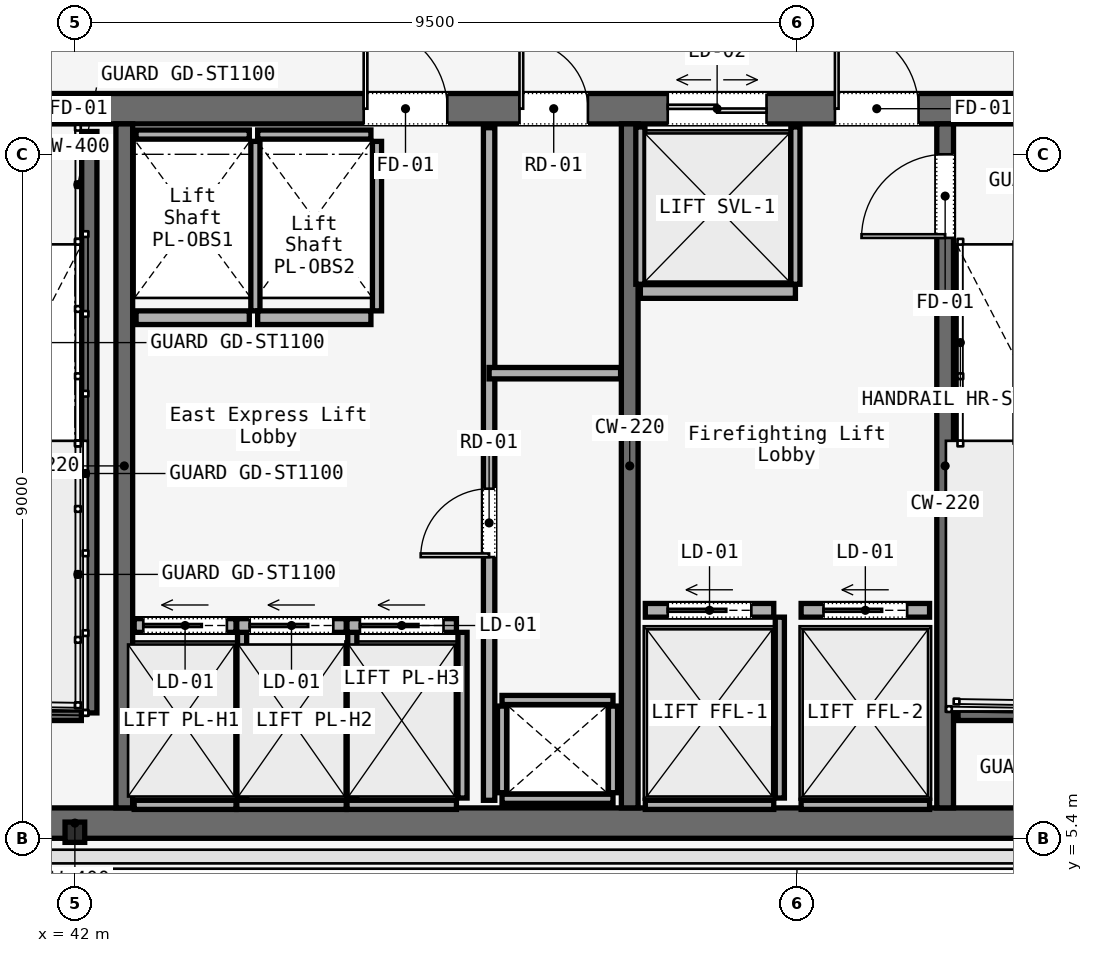
"""IFC4 building model, lengths in metres.
Left out: names, types, materials, properties, quantities, classifications, styles, units other than length and angle.
Written with IfcOpenShell. Run it as: python <this file> out.ifc"""

import sys

from ifc_helpers import new_model, si_unit, direction, frame, frame_2d, origin, origin_2d, place, context, subcontext, project, spatial, rectangle, i_section, extrude, element, fill, save


model = new_model("IFC4")
c1 = context("Model", 3, precision=1e-05, world=origin(), true_north=direction((0.0, 1.0)))
c2 = subcontext(c1, "Body", "Model", "MODEL_VIEW")
j1 = project(units=[si_unit("LENGTHUNIT", "METRE"), si_unit("PLANEANGLEUNIT", "RADIAN")], contexts=[c1])
p1 = place(None, origin())
s1 = spatial("IfcSite", under=j1, at=p1, CompositionType="ELEMENT")
p2 = place(p1, origin())
s2 = spatial("IfcBuilding", under=s1, at=p2, CompositionType="ELEMENT")
p3 = place(p2, frame((0.0, 0.0, 294.7)))
s3 = spatial("IfcBuildingStorey", under=s2, at=p3, CompositionType="ELEMENT", Elevation=294.7)
p4 = place(p3, frame((26.45, 15.0, 0.0), z_axis=(0.0, 0.0, 1.0), x_axis=(1.0, 0.0, 0.0)))
e1 = element("IfcWall", 1, at=p4, inside=s3, PredefinedType="SOLIDWALL", context=c2, shape_type="SweptSolid", body=[
    extrude(rectangle(XDim=31.1, YDim=0.4, at=frame_2d((15.55, 0.0))), origin(), (0.0, 0.0, 1.0), 3.52),
])
p5 = place(p4, frame((1.65, 0.0, 0.0)))
e2 = element("IfcOpeningElement", 2, at=p5, cuts=e1, PredefinedType="OPENING", context=c2, shape_type="SweptSolid", body=[
    extrude(rectangle(XDim=1.1, YDim=2.2, at=frame_2d((0.55, 1.1))), frame((0.0, 0.2, 0.0), z_axis=(0.0, -1.0, 0.0), x_axis=(1.0, 0.0, 0.0)), (0.0, 0.0, 1.0), 0.4),
])
p6 = place(p4, frame((13.65, 0.0, 0.0)))
e3 = element("IfcOpeningElement", 3, at=p6, cuts=e1, PredefinedType="OPENING", context=c2, shape_type="SweptSolid", body=[
    extrude(rectangle(XDim=1.1, YDim=2.2, at=frame_2d((0.55, 1.1))), frame((0.0, 0.2, 0.0), z_axis=(0.0, -1.0, 0.0), x_axis=(1.0, 0.0, 0.0)), (0.0, 0.0, 1.0), 0.4),
])
p7 = place(p4, frame((25.55, 0.0, 0.0)))
e4 = element("IfcOpeningElement", 4, at=p7, cuts=e1, PredefinedType="OPENING", context=c2, shape_type="SweptSolid", body=[
    extrude(rectangle(XDim=1.1, YDim=2.2, at=frame_2d((0.55, 1.1))), frame((0.0, 0.2, 0.0), z_axis=(0.0, -1.0, 0.0), x_axis=(1.0, 0.0, 0.0)), (0.0, 0.0, 1.0), 0.4),
])
p8 = place(p4, frame((19.35, 0.0, 0.0)))
e5 = element("IfcOpeningElement", 5, at=p8, cuts=e1, PredefinedType="OPENING", context=c2, shape_type="SweptSolid", body=[
    extrude(rectangle(XDim=1.1, YDim=2.2, at=frame_2d((0.55, 1.1))), frame((0.0, 0.2, 0.0), z_axis=(0.0, -1.0, 0.0), x_axis=(1.0, 0.0, 0.0)), (0.0, 0.0, 1.0), 0.4),
])
p9 = place(p4, frame((21.4, 0.0, 0.0)))
e6 = element("IfcOpeningElement", 6, at=p9, cuts=e1, PredefinedType="OPENING", context=c2, shape_type="SweptSolid", body=[
    extrude(rectangle(XDim=0.9, YDim=2.1, at=frame_2d((0.45, 1.05))), frame((0.0, 0.2, 0.0), z_axis=(0.0, -1.0, 0.0), x_axis=(1.0, 0.0, 0.0)), (0.0, 0.0, 1.0), 0.4),
])
p10 = place(p4, frame((5.14, 0.0, 0.0)))
e7 = element("IfcOpeningElement", 7, at=p10, cuts=e1, PredefinedType="OPENING", context=c2, shape_type="SweptSolid", body=[
    extrude(rectangle(XDim=0.95, YDim=2.2, at=frame_2d((0.475, 1.1))), frame((0.0, 0.2, 0.0), z_axis=(0.0, -1.0, 0.0), x_axis=(1.0, 0.0, 0.0)), (0.0, 0.0, 1.0), 0.4),
])
p11 = place(p4, frame((7.825, 0.0, 0.0)))
e8 = element("IfcOpeningElement", 8, at=p11, cuts=e1, PredefinedType="OPENING", context=c2, shape_type="SweptSolid", body=[
    extrude(rectangle(XDim=0.95, YDim=2.2, at=frame_2d((0.475, 1.1))), frame((0.0, 0.2, 0.0), z_axis=(0.0, -1.0, 0.0), x_axis=(1.0, 0.0, 0.0)), (0.0, 0.0, 1.0), 0.4),
])
p12 = place(p4, frame((10.46, 0.0, 0.0)))
e9 = element("IfcOpeningElement", 9, at=p12, cuts=e1, PredefinedType="OPENING", context=c2, shape_type="SweptSolid", body=[
    extrude(rectangle(XDim=0.95, YDim=2.2, at=frame_2d((0.475, 1.1))), frame((0.0, 0.2, 0.0), z_axis=(0.0, -1.0, 0.0), x_axis=(1.0, 0.0, 0.0)), (0.0, 0.0, 1.0), 0.4),
])
p13 = place(p4, frame((23.35, 0.0, 0.0)))
e10 = element("IfcOpeningElement", 10, at=p13, cuts=e1, PredefinedType="OPENING", context=c2, shape_type="SweptSolid", body=[
    extrude(rectangle(XDim=1.3, YDim=2.3, at=frame_2d((0.65, 1.15))), frame((0.0, 0.2, 0.0), z_axis=(0.0, -1.0, 0.0), x_axis=(1.0, 0.0, 0.0)), (0.0, 0.0, 1.0), 0.4),
])
p14 = place(p3, frame((26.45, 5.6, 0.0), z_axis=(0.0, 0.0, 1.0), x_axis=(1.0, 0.0, 0.0)))
e11 = element("IfcWall", 11, at=p14, inside=s3, PredefinedType="SOLIDWALL", context=c2, shape_type="SweptSolid", body=[
    extrude(rectangle(XDim=31.1, YDim=0.4, at=frame_2d((15.55, 0.0))), origin(), (0.0, 0.0, 1.0), 3.52),
])
for number, where, z_axis, x_axis in (
    (12, (42.65, 5.8, 0.0), (0.0, 0.0, 1.0), (0.0, 1.0, 0.0)),
    (13, (49.3, 5.8, 0.0), (0.0, 0.0, 1.0), (0.0, 1.0, 0.0)),
):
    element("IfcWall", number, at=place(p3, frame(where, z_axis=z_axis, x_axis=x_axis)), inside=s3, PredefinedType="SOLIDWALL", context=c2, shape_type="SweptSolid", body=[
        extrude(rectangle(XDim=9.0, YDim=0.22, at=frame_2d((4.5, 0.0))), origin(), (0.0, 0.0, 1.0), 3.52),
    ])
p15 = place(p3, frame((53.45, 5.8, 0.0), z_axis=(0.0, 0.0, 1.0), x_axis=(0.0, 1.0, 0.0)))
e14 = element("IfcWall", 14, at=p15, inside=s3, PredefinedType="SOLIDWALL", context=c2, shape_type="SweptSolid", body=[
    extrude(rectangle(XDim=9.0, YDim=0.22, at=frame_2d((4.5, 0.0))), origin(), (0.0, 0.0, 1.0), 3.52),
])
p16 = place(p15, frame((7.5, 0.0, 0.0)))
e15 = element("IfcOpeningElement", 15, at=p16, cuts=e14, PredefinedType="OPENING", context=c2, shape_type="SweptSolid", body=[
    extrude(rectangle(XDim=1.1, YDim=2.2, at=frame_2d((0.55, 1.1))), frame((0.0, 0.11, 0.0), z_axis=(0.0, -1.0, 0.0), x_axis=(1.0, 0.0, 0.0)), (0.0, 0.0, 1.0), 0.22),
])
p17 = place(p3, frame((42.0, 5.48, 0.0), z_axis=(0.0, 0.0, 1.0), x_axis=(1.0, 0.0, 0.0)))
e16 = element("IfcColumn", 16, at=p17, inside=s3, PredefinedType="COLUMN", context=c2, shape_type="SweptSolid", body=[
    extrude(i_section(OverallWidth=0.259, OverallDepth=0.267, WebThickness=0.013, FlangeThickness=0.021, FilletRadius=0.013, at=origin_2d()), origin(), (0.0, 0.0, 1.0), 3.52),
])
p18 = place(p3, frame((42.19, 14.7, 0.0), z_axis=(0.0, 0.0, 1.0), x_axis=(0.0, -1.0, 0.0)))
e17 = element("IfcWall", 17, at=p18, inside=s3, PredefinedType="SOLIDWALL", context=c2, shape_type="SweptSolid", body=[
    extrude(rectangle(XDim=7.65, YDim=0.2, at=frame_2d((3.825, 0.0))), origin(), (0.0, 0.0, 1.0), 3.8),
])
for number, where, z_axis, x_axis in (
    (18, (38.97, 7.05, 0.0), (0.0, 0.0, 1.0), (1.0, 0.0, 0.0)),
    (19, (53.62, 7.05, 0.0), (0.0, 0.0, 1.0), (1.0, 0.0, 0.0)),
):
    element("IfcWall", number, at=place(p3, frame(where, z_axis=z_axis, x_axis=x_axis)), inside=s3, PredefinedType="SOLIDWALL", context=c2, shape_type="SweptSolid", body=[
        extrude(rectangle(XDim=3.115, YDim=0.2, at=frame_2d((1.558, 0.0))), origin(), (0.0, 0.0, 1.0), 3.8),
    ])
for number, where, z_axis, x_axis in (
    (20, (47.62, 5.92, 0.0), (0.0, 0.0, 1.0), (1.0, 0.0, 0.0)),
    (21, (47.62, 7.22, 0.0), (0.0, 0.0, 1.0), (1.0, 0.0, 0.0)),
):
    element("IfcWall", number, at=place(p3, frame(where, z_axis=z_axis, x_axis=x_axis)), inside=s3, PredefinedType="SOLIDWALL", context=c2, shape_type="SweptSolid", body=[
        extrude(rectangle(XDim=1.46, YDim=0.12, at=frame_2d((0.73, 0.0))), origin(), (0.0, 0.0, 1.0), 2.95),
    ])
for number, where, z_axis, x_axis in (
    (22, (47.62, 6.0, 0.0), (0.0, 0.0, 1.0), (0.0, 1.0, 0.0)),
    (23, (49.08, 6.0, 0.0), (0.0, 0.0, 1.0), (0.0, 1.0, 0.0)),
):
    element("IfcWall", number, at=place(p3, frame(where, z_axis=z_axis, x_axis=x_axis)), inside=s3, PredefinedType="SOLIDWALL", context=c2, shape_type="SweptSolid", body=[
        extrude(rectangle(XDim=1.14, YDim=0.12, at=frame_2d((0.57, 0.0))), origin(), (0.0, 0.0, 1.0), 2.95),
    ])
p19 = place(p3, frame((47.45, 5.9, 0.0), z_axis=(0.0, 0.0, 1.0), x_axis=(0.0, 1.0, 0.0)))
e24 = element("IfcWall", 24, at=p19, inside=s3, PredefinedType="PARTITIONING", context=c2, shape_type="SweptSolid", body=[
    extrude(rectangle(XDim=8.85, YDim=0.15, at=frame_2d((4.425, 0.0))), origin(), (0.0, 0.0, 1.0), 2.95),
])
p20 = place(p19, frame((3.2, 0.0, 0.0)))
e25 = element("IfcOpeningElement", 25, at=p20, cuts=e24, PredefinedType="OPENING", context=c2, shape_type="SweptSolid", body=[
    extrude(rectangle(XDim=0.9, YDim=2.1, at=frame_2d((0.45, 1.05))), frame((0.0, 0.075, 0.0), z_axis=(0.0, -1.0, 0.0), x_axis=(1.0, 0.0, 0.0)), (0.0, 0.0, 1.0), 0.15),
])
p21 = place(p3, frame((47.45, 11.52, 0.0), z_axis=(0.0, 0.0, 1.0), x_axis=(1.0, 0.0, 0.0)))
e26 = element("IfcWall", 26, at=p21, inside=s3, PredefinedType="PARTITIONING", context=c2, shape_type="SweptSolid", body=[
    extrude(rectangle(XDim=1.73, YDim=0.15, at=frame_2d((0.865, 0.0))), origin(), (0.0, 0.0, 1.0), 2.95),
])
p22 = place(p3, frame((42.78, 8.2, 0.0), z_axis=(0.0, 0.0, 1.0), x_axis=(1.0, 0.0, 0.0)))
e27 = element("IfcWall", 27, at=p22, inside=s3, PredefinedType="SOLIDWALL", context=c2, shape_type="SweptSolid", body=[
    extrude(rectangle(XDim=1.34, YDim=0.18, at=frame_2d((0.67, 0.0))), origin(), (0.0, 0.0, 1.0), 2.95),
])
p23 = place(p22, frame((0.12, 0.0, 0.0)))
e28 = element("IfcOpeningElement", 28, at=p23, cuts=e27, PredefinedType="OPENING", context=c2, shape_type="SweptSolid", body=[
    extrude(rectangle(XDim=1.1, YDim=2.2, at=frame_2d((0.55, 1.1))), frame((0.0, 0.09, 0.0), z_axis=(0.0, -1.0, 0.0), x_axis=(1.0, 0.0, 0.0)), (0.0, 0.0, 1.0), 0.18),
])
p24 = place(p3, frame((42.78, 5.84, 0.0), z_axis=(0.0, 0.0, 1.0), x_axis=(1.0, 0.0, 0.0)))
e29 = element("IfcWall", 29, at=p24, inside=s3, PredefinedType="SOLIDWALL", context=c2, shape_type="SweptSolid", body=[
    extrude(rectangle(XDim=1.34, YDim=0.12, at=frame_2d((0.67, 0.0))), origin(), (0.0, 0.0, 1.0), 2.95),
])
p25 = place(p3, frame((44.2, 5.93, 0.0), z_axis=(0.0, 0.0, 1.0), x_axis=(0.0, 1.0, 0.0)))
e30 = element("IfcWall", 30, at=p25, inside=s3, PredefinedType="SOLIDWALL", context=c2, shape_type="SweptSolid", body=[
    extrude(rectangle(XDim=2.18, YDim=0.12, at=frame_2d((1.09, 0.0))), origin(), (0.0, 0.0, 1.0), 2.95),
])
p26 = place(p3, frame((44.13, 8.2, 0.0), z_axis=(0.0, 0.0, 1.0), x_axis=(1.0, 0.0, 0.0)))
e31 = element("IfcWall", 31, at=p26, inside=s3, PredefinedType="SOLIDWALL", context=c2, shape_type="SweptSolid", body=[
    extrude(rectangle(XDim=1.44, YDim=0.18, at=frame_2d((0.72, 0.0))), origin(), (0.0, 0.0, 1.0), 2.95),
])
p27 = place(p26, frame((0.17, 0.0, 0.0)))
e32 = element("IfcOpeningElement", 32, at=p27, cuts=e31, PredefinedType="OPENING", context=c2, shape_type="SweptSolid", body=[
    extrude(rectangle(XDim=1.1, YDim=2.2, at=frame_2d((0.55, 1.1))), frame((0.0, 0.09, 0.0), z_axis=(0.0, -1.0, 0.0), x_axis=(1.0, 0.0, 0.0)), (0.0, 0.0, 1.0), 0.18),
])
p28 = place(p3, frame((44.13, 5.84, 0.0), z_axis=(0.0, 0.0, 1.0), x_axis=(1.0, 0.0, 0.0)))
e33 = element("IfcWall", 33, at=p28, inside=s3, PredefinedType="SOLIDWALL", context=c2, shape_type="SweptSolid", body=[
    extrude(rectangle(XDim=1.44, YDim=0.12, at=frame_2d((0.72, 0.0))), origin(), (0.0, 0.0, 1.0), 2.95),
])
p29 = place(p3, frame((45.65, 5.93, 0.0), z_axis=(0.0, 0.0, 1.0), x_axis=(0.0, 1.0, 0.0)))
e34 = element("IfcWall", 34, at=p29, inside=s3, PredefinedType="SOLIDWALL", context=c2, shape_type="SweptSolid", body=[
    extrude(rectangle(XDim=2.18, YDim=0.12, at=frame_2d((1.09, 0.0))), origin(), (0.0, 0.0, 1.0), 2.95),
])
p30 = place(p3, frame((45.58, 8.2, 0.0), z_axis=(0.0, 0.0, 1.0), x_axis=(1.0, 0.0, 0.0)))
e35 = element("IfcWall", 35, at=p30, inside=s3, PredefinedType="SOLIDWALL", context=c2, shape_type="SweptSolid", body=[
    extrude(rectangle(XDim=1.44, YDim=0.18, at=frame_2d((0.72, 0.0))), origin(), (0.0, 0.0, 1.0), 2.95),
])
p31 = place(p30, frame((0.17, 0.0, 0.0)))
e36 = element("IfcOpeningElement", 36, at=p31, cuts=e35, PredefinedType="OPENING", context=c2, shape_type="SweptSolid", body=[
    extrude(rectangle(XDim=1.1, YDim=2.2, at=frame_2d((0.55, 1.1))), frame((0.0, 0.09, 0.0), z_axis=(0.0, -1.0, 0.0), x_axis=(1.0, 0.0, 0.0)), (0.0, 0.0, 1.0), 0.18),
])
p32 = place(p3, frame((45.58, 5.84, 0.0), z_axis=(0.0, 0.0, 1.0), x_axis=(1.0, 0.0, 0.0)))
e37 = element("IfcWall", 37, at=p32, inside=s3, PredefinedType="SOLIDWALL", context=c2, shape_type="SweptSolid", body=[
    extrude(rectangle(XDim=1.44, YDim=0.12, at=frame_2d((0.72, 0.0))), origin(), (0.0, 0.0, 1.0), 2.95),
])
p33 = place(p3, frame((47.1, 5.93, 0.0), z_axis=(0.0, 0.0, 1.0), x_axis=(0.0, 1.0, 0.0)))
e38 = element("IfcWall", 38, at=p33, inside=s3, PredefinedType="SOLIDWALL", context=c2, shape_type="SweptSolid", body=[
    extrude(rectangle(XDim=2.18, YDim=0.12, at=frame_2d((1.09, 0.0))), origin(), (0.0, 0.0, 1.0), 2.95),
])
p34 = place(p3, frame((42.805, 12.25, 0.0), z_axis=(0.0, 0.0, 1.0), x_axis=(1.0, 0.0, 0.0)))
e39 = element("IfcWall", 39, at=p34, inside=s3, PredefinedType="SOLIDWALL", context=c2, shape_type="SweptSolid", body=[
    extrude(rectangle(XDim=1.49, YDim=0.18, at=frame_2d((0.745, 0.0))), origin(), (0.0, 0.0, 1.0), 2.95),
])
p35 = place(p3, frame((42.805, 14.66, 0.0), z_axis=(0.0, 0.0, 1.0), x_axis=(1.0, 0.0, 0.0)))
e40 = element("IfcWall", 40, at=p35, inside=s3, PredefinedType="SOLIDWALL", context=c2, shape_type="SweptSolid", body=[
    extrude(rectangle(XDim=1.49, YDim=0.12, at=frame_2d((0.745, 0.0))), origin(), (0.0, 0.0, 1.0), 2.95),
])
p36 = place(p3, frame((44.375, 12.34, 0.0), z_axis=(0.0, 0.0, 1.0), x_axis=(0.0, 1.0, 0.0)))
e41 = element("IfcWall", 41, at=p36, inside=s3, PredefinedType="SOLIDWALL", context=c2, shape_type="SweptSolid", body=[
    extrude(rectangle(XDim=2.23, YDim=0.12, at=frame_2d((1.115, 0.0))), origin(), (0.0, 0.0, 1.0), 2.95),
])
p37 = place(p3, frame((44.405, 12.25, 0.0), z_axis=(0.0, 0.0, 1.0), x_axis=(1.0, 0.0, 0.0)))
e42 = element("IfcWall", 42, at=p37, inside=s3, PredefinedType="SOLIDWALL", context=c2, shape_type="SweptSolid", body=[
    extrude(rectangle(XDim=1.49, YDim=0.18, at=frame_2d((0.745, 0.0))), origin(), (0.0, 0.0, 1.0), 2.95),
])
p38 = place(p3, frame((44.405, 14.66, 0.0), z_axis=(0.0, 0.0, 1.0), x_axis=(1.0, 0.0, 0.0)))
e43 = element("IfcWall", 43, at=p38, inside=s3, PredefinedType="SOLIDWALL", context=c2, shape_type="SweptSolid", body=[
    extrude(rectangle(XDim=1.49, YDim=0.12, at=frame_2d((0.745, 0.0))), origin(), (0.0, 0.0, 1.0), 2.95),
])
p39 = place(p3, frame((45.975, 12.34, 0.0), z_axis=(0.0, 0.0, 1.0), x_axis=(0.0, 1.0, 0.0)))
e44 = element("IfcWall", 44, at=p39, inside=s3, PredefinedType="SOLIDWALL", context=c2, shape_type="SweptSolid", body=[
    extrude(rectangle(XDim=2.23, YDim=0.12, at=frame_2d((1.115, 0.0))), origin(), (0.0, 0.0, 1.0), 2.95),
])
p40 = place(p3, frame((49.505, 8.4, 0.0), z_axis=(0.0, 0.0, 1.0), x_axis=(1.0, 0.0, 0.0)))
e45 = element("IfcWall", 45, at=p40, inside=s3, PredefinedType="SOLIDWALL", context=c2, shape_type="SweptSolid", body=[
    extrude(rectangle(XDim=1.69, YDim=0.18, at=frame_2d((0.845, 0.0))), origin(), (0.0, 0.0, 1.0), 2.95),
])
p41 = place(p40, frame((0.295, 0.0, 0.0)))
e46 = element("IfcOpeningElement", 46, at=p41, cuts=e45, PredefinedType="OPENING", context=c2, shape_type="SweptSolid", body=[
    extrude(rectangle(XDim=1.1, YDim=2.2, at=frame_2d((0.55, 1.1))), frame((0.0, 0.09, 0.0), z_axis=(0.0, -1.0, 0.0), x_axis=(1.0, 0.0, 0.0)), (0.0, 0.0, 1.0), 0.18),
])
p42 = place(p3, frame((49.505, 5.84, 0.0), z_axis=(0.0, 0.0, 1.0), x_axis=(1.0, 0.0, 0.0)))
e47 = element("IfcWall", 47, at=p42, inside=s3, PredefinedType="SOLIDWALL", context=c2, shape_type="SweptSolid", body=[
    extrude(rectangle(XDim=1.69, YDim=0.12, at=frame_2d((0.845, 0.0))), origin(), (0.0, 0.0, 1.0), 2.95),
])
p43 = place(p3, frame((51.275, 5.93, 0.0), z_axis=(0.0, 0.0, 1.0), x_axis=(0.0, 1.0, 0.0)))
e48 = element("IfcWall", 48, at=p43, inside=s3, PredefinedType="SOLIDWALL", context=c2, shape_type="SweptSolid", body=[
    extrude(rectangle(XDim=2.38, YDim=0.12, at=frame_2d((1.19, 0.0))), origin(), (0.0, 0.0, 1.0), 2.95),
])
p44 = place(p3, frame((51.555, 8.4, 0.0), z_axis=(0.0, 0.0, 1.0), x_axis=(1.0, 0.0, 0.0)))
e49 = element("IfcWall", 49, at=p44, inside=s3, PredefinedType="SOLIDWALL", context=c2, shape_type="SweptSolid", body=[
    extrude(rectangle(XDim=1.69, YDim=0.18, at=frame_2d((0.845, 0.0))), origin(), (0.0, 0.0, 1.0), 2.95),
])
p45 = place(p44, frame((0.295, 0.0, 0.0)))
e50 = element("IfcOpeningElement", 50, at=p45, cuts=e49, PredefinedType="OPENING", context=c2, shape_type="SweptSolid", body=[
    extrude(rectangle(XDim=1.1, YDim=2.2, at=frame_2d((0.55, 1.1))), frame((0.0, 0.09, 0.0), z_axis=(0.0, -1.0, 0.0), x_axis=(1.0, 0.0, 0.0)), (0.0, 0.0, 1.0), 0.18),
])
p46 = place(p3, frame((51.555, 5.84, 0.0), z_axis=(0.0, 0.0, 1.0), x_axis=(1.0, 0.0, 0.0)))
e51 = element("IfcWall", 51, at=p46, inside=s3, PredefinedType="SOLIDWALL", context=c2, shape_type="SweptSolid", body=[
    extrude(rectangle(XDim=1.69, YDim=0.12, at=frame_2d((0.845, 0.0))), origin(), (0.0, 0.0, 1.0), 2.95),
])
p47 = place(p3, frame((49.44, 12.595, 0.0), z_axis=(0.0, 0.0, 1.0), x_axis=(1.0, 0.0, 0.0)))
e52 = element("IfcWall", 52, at=p47, inside=s3, PredefinedType="SOLIDWALL", context=c2, shape_type="SweptSolid", body=[
    extrude(rectangle(XDim=2.04, YDim=0.18, at=frame_2d((1.02, 0.0))), origin(), (0.0, 0.0, 1.0), 2.95),
])
for number, where, z_axis, x_axis in (
    (53, (49.44, 12.69, 0.0), (0.0, 0.0, 1.0), (0.0, 1.0, 0.0)),
    (54, (51.48, 12.69, 0.0), (0.0, 0.0, 1.0), (0.0, 1.0, 0.0)),
):
    element("IfcWall", number, at=place(p3, frame(where, z_axis=z_axis, x_axis=x_axis)), inside=s3, PredefinedType="SOLIDWALL", context=c2, shape_type="SweptSolid", body=[
        extrude(rectangle(XDim=2.07, YDim=0.12, at=frame_2d((1.035, 0.0))), origin(), (0.0, 0.0, 1.0), 2.95),
    ])
p48 = place(p7, origin())
e55 = element("IfcDoor", 55, at=p48, inside=s3, OperationType="SINGLE_SWING_RIGHT", PredefinedType="DOOR", context=c2, shape_type="SweptSolid", body=[
    extrude(rectangle(XDim=1.1, YDim=2.2, at=frame_2d((0.55, 1.1))), frame((0.0, 0.025, 0.0), z_axis=(0.0, -1.0, 0.0), x_axis=(1.0, 0.0, 0.0)), (0.0, 0.0, 1.0), 0.05),
])
fill(e4, e55)
p49 = place(p8, origin())
e56 = element("IfcDoor", 56, at=p49, inside=s3, OperationType="SINGLE_SWING_LEFT", PredefinedType="DOOR", context=c2, shape_type="SweptSolid", body=[
    extrude(rectangle(XDim=1.1, YDim=2.2, at=frame_2d((0.55, 1.1))), frame((0.0, 0.025, 0.0), z_axis=(0.0, -1.0, 0.0), x_axis=(1.0, 0.0, 0.0)), (0.0, 0.0, 1.0), 0.05),
])
fill(e5, e56)
p50 = place(p9, origin())
e57 = element("IfcDoor", 57, at=p50, inside=s3, OperationType="SINGLE_SWING_LEFT", PredefinedType="DOOR", context=c2, shape_type="SweptSolid", body=[
    extrude(rectangle(XDim=0.9, YDim=2.1, at=frame_2d((0.45, 1.05))), frame((0.0, 0.025, 0.0), z_axis=(0.0, -1.0, 0.0), x_axis=(1.0, 0.0, 0.0)), (0.0, 0.0, 1.0), 0.05),
])
fill(e6, e57)
p51 = place(p16, origin())
e58 = element("IfcDoor", 58, at=p51, inside=s3, OperationType="SINGLE_SWING_LEFT", PredefinedType="DOOR", context=c2, shape_type="SweptSolid", body=[
    extrude(rectangle(XDim=1.1, YDim=2.2, at=frame_2d((0.55, 1.1))), frame((0.0, 0.025, 0.0), z_axis=(0.0, -1.0, 0.0), x_axis=(1.0, 0.0, 0.0)), (0.0, 0.0, 1.0), 0.05),
])
fill(e15, e58)
p52 = place(p20, origin())
e59 = element("IfcDoor", 59, at=p52, inside=s3, OperationType="SINGLE_SWING_LEFT", PredefinedType="DOOR", context=c2, shape_type="SweptSolid", body=[
    extrude(rectangle(XDim=0.9, YDim=2.1, at=frame_2d((0.45, 1.05))), frame((0.0, 0.025, 0.0), z_axis=(0.0, -1.0, 0.0), x_axis=(1.0, 0.0, 0.0)), (0.0, 0.0, 1.0), 0.05),
])
fill(e25, e59)
p53 = place(p23, origin())
e60 = element("IfcDoor", 60, at=p53, inside=s3, OperationType="SLIDING_TO_LEFT", PredefinedType="DOOR", context=c2, shape_type="SweptSolid", body=[
    extrude(rectangle(XDim=1.1, YDim=2.2, at=frame_2d((0.55, 1.1))), frame((0.0, 0.025, 0.0), z_axis=(0.0, -1.0, 0.0), x_axis=(1.0, 0.0, 0.0)), (0.0, 0.0, 1.0), 0.05),
])
fill(e28, e60)
p54 = place(p27, origin())
e61 = element("IfcDoor", 61, at=p54, inside=s3, OperationType="SLIDING_TO_LEFT", PredefinedType="DOOR", context=c2, shape_type="SweptSolid", body=[
    extrude(rectangle(XDim=1.1, YDim=2.2, at=frame_2d((0.55, 1.1))), frame((0.0, 0.025, 0.0), z_axis=(0.0, -1.0, 0.0), x_axis=(1.0, 0.0, 0.0)), (0.0, 0.0, 1.0), 0.05),
])
fill(e32, e61)
p55 = place(p31, origin())
e62 = element("IfcDoor", 62, at=p55, inside=s3, OperationType="SLIDING_TO_LEFT", PredefinedType="DOOR", context=c2, shape_type="SweptSolid", body=[
    extrude(rectangle(XDim=1.1, YDim=2.2, at=frame_2d((0.55, 1.1))), frame((0.0, 0.025, 0.0), z_axis=(0.0, -1.0, 0.0), x_axis=(1.0, 0.0, 0.0)), (0.0, 0.0, 1.0), 0.05),
])
fill(e36, e62)
p56 = place(p41, origin())
e63 = element("IfcDoor", 63, at=p56, inside=s3, OperationType="SLIDING_TO_LEFT", PredefinedType="DOOR", context=c2, shape_type="SweptSolid", body=[
    extrude(rectangle(XDim=1.1, YDim=2.2, at=frame_2d((0.55, 1.1))), frame((0.0, 0.025, 0.0), z_axis=(0.0, -1.0, 0.0), x_axis=(1.0, 0.0, 0.0)), (0.0, 0.0, 1.0), 0.05),
])
fill(e46, e63)
p57 = place(p45, origin())
e64 = element("IfcDoor", 64, at=p57, inside=s3, OperationType="SLIDING_TO_LEFT", PredefinedType="DOOR", context=c2, shape_type="SweptSolid", body=[
    extrude(rectangle(XDim=1.1, YDim=2.2, at=frame_2d((0.55, 1.1))), frame((0.0, 0.025, 0.0), z_axis=(0.0, -1.0, 0.0), x_axis=(1.0, 0.0, 0.0)), (0.0, 0.0, 1.0), 0.05),
])
fill(e50, e64)
p58 = place(p13, origin())
e65 = element("IfcDoor", 65, at=p58, inside=s3, OperationType="DOUBLE_DOOR_SLIDING", PredefinedType="DOOR", context=c2, shape_type="SweptSolid", body=[
    extrude(rectangle(XDim=1.3, YDim=2.3, at=frame_2d((0.65, 1.15))), frame((0.0, 0.025, 0.0), z_axis=(0.0, -1.0, 0.0), x_axis=(1.0, 0.0, 0.0)), (0.0, 0.0, 1.0), 0.05),
])
fill(e10, e65)
save(model, sys.argv[1])
